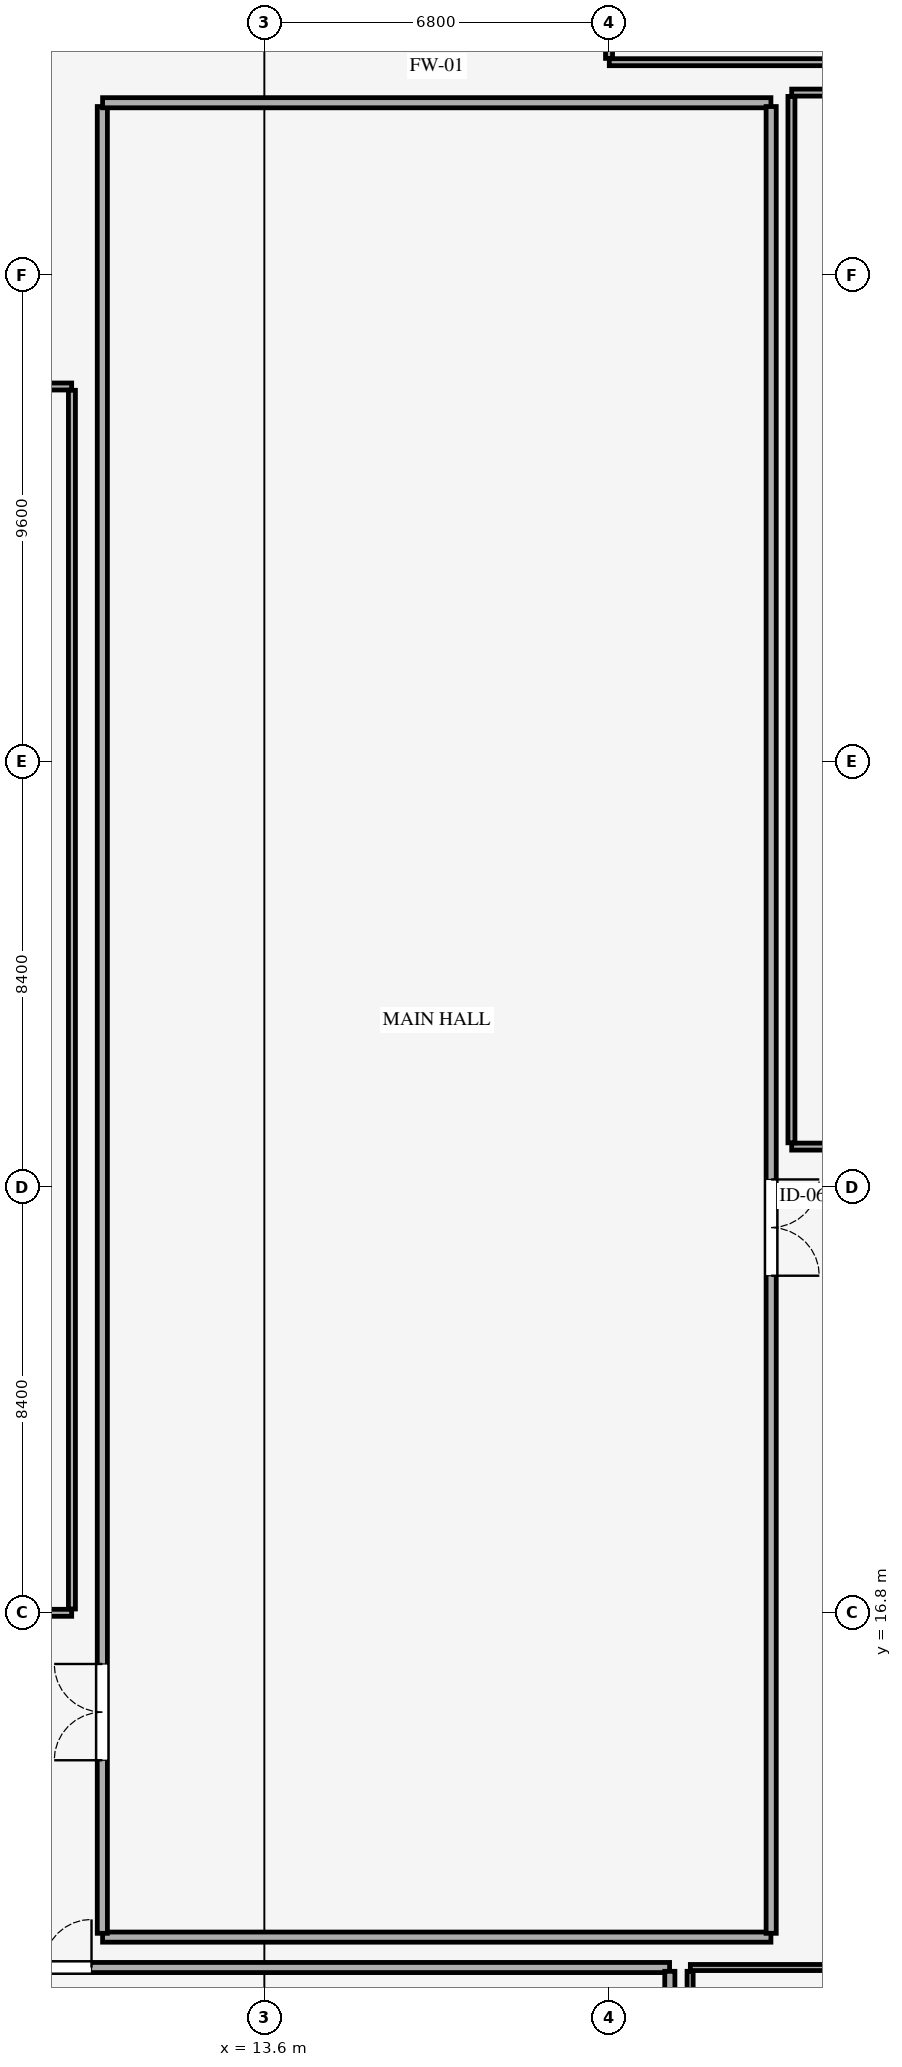
"""IFC4 building model, lengths in metres.
Left out: names, types, materials, properties, quantities, classifications, styles, units other than length and angle.
Written with IfcOpenShell. Run it as: python <this file> out.ifc"""

import sys

from ifc_helpers import new_model, si_unit, direction, frame, frame_2d, origin, place, context, subcontext, project, spatial, rectangle, extrude, element, fill, save


model = new_model("IFC4")
c1 = context("Model", 3, precision=1e-05, world=origin(), true_north=direction((0.0, 1.0)))
c2 = subcontext(c1, "Body", "Model", "MODEL_VIEW")
j1 = project(units=[si_unit("LENGTHUNIT", "METRE"), si_unit("PLANEANGLEUNIT", "RADIAN")], contexts=[c1])
p1 = place(None, origin())
s1 = spatial("IfcSite", under=j1, at=p1, CompositionType="ELEMENT")
p2 = place(p1, origin())
s2 = spatial("IfcBuilding", under=s1, at=p2, CompositionType="ELEMENT")
p3 = place(p2, origin())
s3 = spatial("IfcBuildingStorey", under=s2, at=p3, CompositionType="ELEMENT", Elevation=0.0)
p4 = place(p3, frame((38.096, 26.0, 0.0), z_axis=(0.0, 0.0, 1.0), x_axis=(-1.0, 0.0, 0.0)))
e1 = element("IfcWall", 1, at=p4, inside=s3, PredefinedType="STANDARD", context=c2, shape_type="SweptSolid", body=[
    extrude(rectangle(XDim=14.091, YDim=0.138, at=frame_2d((7.045, 0.0))), origin(), (0.0, 0.0, 1.0), 3.62),
])
p5 = place(p4, frame((6.535, 0.0, 0.0)))
e2 = element("IfcOpeningElement", 2, at=p5, cuts=e1, PredefinedType="OPENING", context=c2, shape_type="SweptSolid", body=[
    extrude(rectangle(XDim=1.02, YDim=2.12, at=frame_2d((0.51, 1.06))), frame((0.0, 0.079, 0.0), z_axis=(0.0, -1.0, 0.0), x_axis=(1.0, 0.0, 0.0)), (0.0, 0.0, 1.0), 0.158),
])
p6 = place(p3, frame((24.0, 26.075, 0.0), z_axis=(0.0, 0.0, 1.0), x_axis=(0.0, 1.0, 0.0)))
e3 = element("IfcWall", 3, at=p6, inside=s3, PredefinedType="STANDARD", context=c2, shape_type="SweptSolid", body=[
    extrude(rectangle(XDim=20.65, YDim=0.138, at=frame_2d((10.325, 0.0))), origin(), (0.0, 0.0, 1.0), 4.49),
])
p7 = place(p3, frame((24.005, 46.8, 0.0), z_axis=(0.0, 0.0, 1.0), x_axis=(1.0, 0.0, 0.0)))
e4 = element("IfcWall", 4, at=p7, inside=s3, PredefinedType="STANDARD", context=c2, shape_type="SweptSolid", body=[
    extrude(rectangle(XDim=4.169, YDim=0.138, at=frame_2d((2.084, 0.0))), origin(), (0.0, 0.0, 1.0), 3.62),
])
p8 = place(p3, frame((28.042, 47.4, 0.0), z_axis=(0.0, 0.0, 1.0), x_axis=(-1.0, 0.0, 0.0)))
e5 = element("IfcWall", 5, at=p8, inside=s3, PredefinedType="STANDARD", context=c2, shape_type="SweptSolid", body=[
    extrude(rectangle(XDim=7.637, YDim=0.138, at=frame_2d((3.819, 0.0))), origin(), (0.0, 0.0, 1.0), 3.62),
])
p9 = place(p3, frame((20.4, 47.475, 0.0), z_axis=(0.0, 0.0, 1.0), x_axis=(0.0, 1.0, 0.0)))
e6 = element("IfcWall", 6, at=p9, inside=s3, PredefinedType="STANDARD", context=c2, shape_type="SweptSolid", body=[
    extrude(rectangle(XDim=6.45, YDim=0.138, at=frame_2d((3.225, 0.0))), origin(), (0.0, 0.0, 1.0), 3.62),
])
p10 = place(p3, frame((23.595, 10.4, 0.0), z_axis=(0.0, 0.0, 1.0), x_axis=(-1.0, 0.0, 0.0)))
e7 = element("IfcWall", 7, at=p10, inside=s3, PredefinedType="STANDARD", context=c2, shape_type="SweptSolid", body=[
    extrude(rectangle(XDim=13.19, YDim=0.2, at=frame_2d((6.595, 0.0))), origin(), (0.0, 0.0, 1.0), 4.49),
])
p11 = place(p3, frame((10.4, 10.475, 0.0), z_axis=(0.0, 0.0, 1.0), x_axis=(0.0, 1.0, 0.0)))
e8 = element("IfcWall", 8, at=p11, inside=s3, PredefinedType="STANDARD", context=c2, shape_type="SweptSolid", body=[
    extrude(rectangle(XDim=36.05, YDim=0.2, at=frame_2d((18.025, 0.0))), origin(), (0.0, 0.0, 1.0), 4.49),
])
p12 = place(p11, frame((3.415, 0.0, 0.0)))
e9 = element("IfcOpeningElement", 9, at=p12, cuts=e8, PredefinedType="OPENING", context=c2, shape_type="SweptSolid", body=[
    extrude(rectangle(XDim=1.9, YDim=2.35, at=frame_2d((0.95, 1.175))), frame((0.0, 0.11, 0.0), z_axis=(0.0, -1.0, 0.0), x_axis=(1.0, 0.0, 0.0)), (0.0, 0.0, 1.0), 0.22),
])
p13 = place(p3, frame((10.405, 46.6, 0.0), z_axis=(0.0, 0.0, 1.0), x_axis=(1.0, 0.0, 0.0)))
e10 = element("IfcWall", 10, at=p13, inside=s3, PredefinedType="STANDARD", context=c2, shape_type="SweptSolid", body=[
    extrude(rectangle(XDim=13.19, YDim=0.2, at=frame_2d((6.595, 0.0))), origin(), (0.0, 0.0, 1.0), 4.49),
])
p14 = place(p3, frame((23.6, 46.525, 0.0), z_axis=(0.0, 0.0, 1.0), x_axis=(0.0, -1.0, 0.0)))
e11 = element("IfcWall", 11, at=p14, inside=s3, PredefinedType="STANDARD", context=c2, shape_type="SweptSolid", body=[
    extrude(rectangle(XDim=36.05, YDim=0.2, at=frame_2d((18.025, 0.0))), origin(), (0.0, 0.0, 1.0), 4.49),
])
p15 = place(p14, frame((21.173, 0.0, 0.0)))
e12 = element("IfcOpeningElement", 12, at=p15, cuts=e11, PredefinedType="OPENING", context=c2, shape_type="SweptSolid", body=[
    extrude(rectangle(XDim=1.9, YDim=2.35, at=frame_2d((0.95, 1.175))), frame((0.0, 0.11, 0.0), z_axis=(0.0, -1.0, 0.0), x_axis=(1.0, 0.0, 0.0)), (0.0, 0.0, 1.0), 0.22),
])
p16 = place(p3, frame((0.725, 41.0, 0.0), z_axis=(0.0, 0.0, 1.0), x_axis=(1.0, 0.0, 0.0)))
e13 = element("IfcWall", 13, at=p16, inside=s3, PredefinedType="STANDARD", context=c2, shape_type="SweptSolid", body=[
    extrude(rectangle(XDim=9.07, YDim=0.138, at=frame_2d((4.535, 0.0))), origin(), (0.0, 0.0, 1.0), 3.62),
])
p17 = place(p3, frame((9.8, 40.925, 0.0), z_axis=(0.0, 0.0, 1.0), x_axis=(0.0, -1.0, 0.0)))
e14 = element("IfcWall", 14, at=p17, inside=s3, PredefinedType="STANDARD", context=c2, shape_type="SweptSolid", body=[
    extrude(rectangle(XDim=24.05, YDim=0.138, at=frame_2d((12.025, 0.0))), origin(), (0.0, 0.0, 1.0), 4.49),
])
p18 = place(p3, frame((9.795, 16.8, 0.0), z_axis=(0.0, 0.0, 1.0), x_axis=(-1.0, 0.0, 0.0)))
e15 = element("IfcWall", 15, at=p18, inside=s3, PredefinedType="STANDARD", context=c2, shape_type="SweptSolid", body=[
    extrude(rectangle(XDim=6.829, YDim=0.138, at=frame_2d((3.414, 0.0))), origin(), (0.0, 0.0, 1.0), 3.62),
])
p19 = place(p18, frame((3.583, 0.0, 0.0)))
e16 = element("IfcOpeningElement", 16, at=p19, cuts=e15, PredefinedType="OPENING", context=c2, shape_type="SweptSolid", body=[
    extrude(rectangle(XDim=1.05, YDim=2.15, at=frame_2d((0.525, 1.075))), frame((0.0, 0.079, 0.0), z_axis=(0.0, -1.0, 0.0), x_axis=(1.0, 0.0, 0.0)), (0.0, 0.0, 1.0), 0.158),
])
p20 = place(p3, frame((22.0, 5.875, 0.0), z_axis=(0.0, 0.0, 1.0), x_axis=(0.0, 1.0, 0.0)))
e17 = element("IfcWall", 17, at=p20, inside=s3, PredefinedType="STANDARD", context=c2, shape_type="SweptSolid", body=[
    extrude(rectangle(XDim=3.85, YDim=0.12, at=frame_2d((1.925, 0.0))), origin(), (0.0, 0.0, 1.0), 4.49),
])
p21 = place(p3, frame((22.005, 9.8, 0.0), z_axis=(0.0, 0.0, 1.0), x_axis=(1.0, 0.0, 0.0)))
e18 = element("IfcWall", 18, at=p21, inside=s3, PredefinedType="STANDARD", context=c2, shape_type="SweptSolid", body=[
    extrude(rectangle(XDim=11.39, YDim=0.12, at=frame_2d((5.695, 0.0))), origin(), (0.0, 0.0, 1.0), 4.49),
])
p22 = place(p21, frame((6.026, 0.0, 0.0)))
e19 = element("IfcOpeningElement", 19, at=p22, cuts=e18, PredefinedType="OPENING", context=c2, shape_type="SweptSolid", body=[
    extrude(rectangle(XDim=1.0, YDim=2.1, at=frame_2d((0.5, 1.05))), frame((0.0, 0.07, 0.0), z_axis=(0.0, -1.0, 0.0), x_axis=(1.0, 0.0, 0.0)), (0.0, 0.0, 1.0), 0.14),
])
p23 = place(p3, frame((5.782, 9.8, 0.0), z_axis=(0.0, 0.0, 1.0), x_axis=(1.0, 0.0, 0.0)))
e20 = element("IfcWall", 20, at=p23, inside=s3, PredefinedType="STANDARD", context=c2, shape_type="SweptSolid", body=[
    extrude(rectangle(XDim=15.812, YDim=0.2, at=frame_2d((7.906, 0.0))), origin(), (0.0, 0.0, 1.0), 3.62),
])
p24 = place(p23, frame((2.504, 0.0, 0.0)))
e21 = element("IfcOpeningElement", 21, at=p24, cuts=e20, PredefinedType="OPENING", context=c2, shape_type="SweptSolid", body=[
    extrude(rectangle(XDim=1.9, YDim=2.35, at=frame_2d((0.95, 1.175))), frame((0.0, 0.11, 0.0), z_axis=(0.0, -1.0, 0.0), x_axis=(1.0, 0.0, 0.0)), (0.0, 0.0, 1.0), 0.22),
])
p25 = place(p3, frame((21.6, 9.725, 0.0), z_axis=(0.0, 0.0, 1.0), x_axis=(0.0, -1.0, 0.0)))
e22 = element("IfcWall", 22, at=p25, inside=s3, PredefinedType="STANDARD", context=c2, shape_type="SweptSolid", body=[
    extrude(rectangle(XDim=8.124, YDim=0.2, at=frame_2d((4.062, 0.0))), origin(), (0.0, 0.0, 1.0), 4.49),
])
p26 = place(p12, origin())
e23 = element("IfcDoor", 23, at=p26, inside=s3, OperationType="DOUBLE_DOOR_SINGLE_SWING", PredefinedType="DOOR", context=c2, shape_type="SweptSolid", body=[
    extrude(rectangle(XDim=1.9, YDim=2.35, at=frame_2d((0.95, 1.175))), frame((0.0, 0.025, 0.0), z_axis=(0.0, -1.0, 0.0), x_axis=(1.0, 0.0, 0.0)), (0.0, 0.0, 1.0), 0.05),
])
fill(e9, e23)
p27 = place(p15, origin())
e24 = element("IfcDoor", 24, at=p27, inside=s3, OperationType="DOUBLE_DOOR_SINGLE_SWING", PredefinedType="DOOR", context=c2, shape_type="SweptSolid", body=[
    extrude(rectangle(XDim=1.9, YDim=2.35, at=frame_2d((0.95, 1.175))), frame((0.0, 0.025, 0.0), z_axis=(0.0, -1.0, 0.0), x_axis=(1.0, 0.0, 0.0)), (0.0, 0.0, 1.0), 0.05),
])
fill(e12, e24)
p28 = place(p24, origin())
e25 = element("IfcDoor", 25, at=p28, inside=s3, OperationType="DOUBLE_DOOR_SINGLE_SWING", PredefinedType="DOOR", context=c2, shape_type="SweptSolid", body=[
    extrude(rectangle(XDim=1.9, YDim=2.35, at=frame_2d((0.95, 1.175))), frame((0.0, 0.025, 0.0), z_axis=(0.0, -1.0, 0.0), x_axis=(1.0, 0.0, 0.0)), (0.0, 0.0, 1.0), 0.05),
])
fill(e21, e25)
save(model, sys.argv[1])
